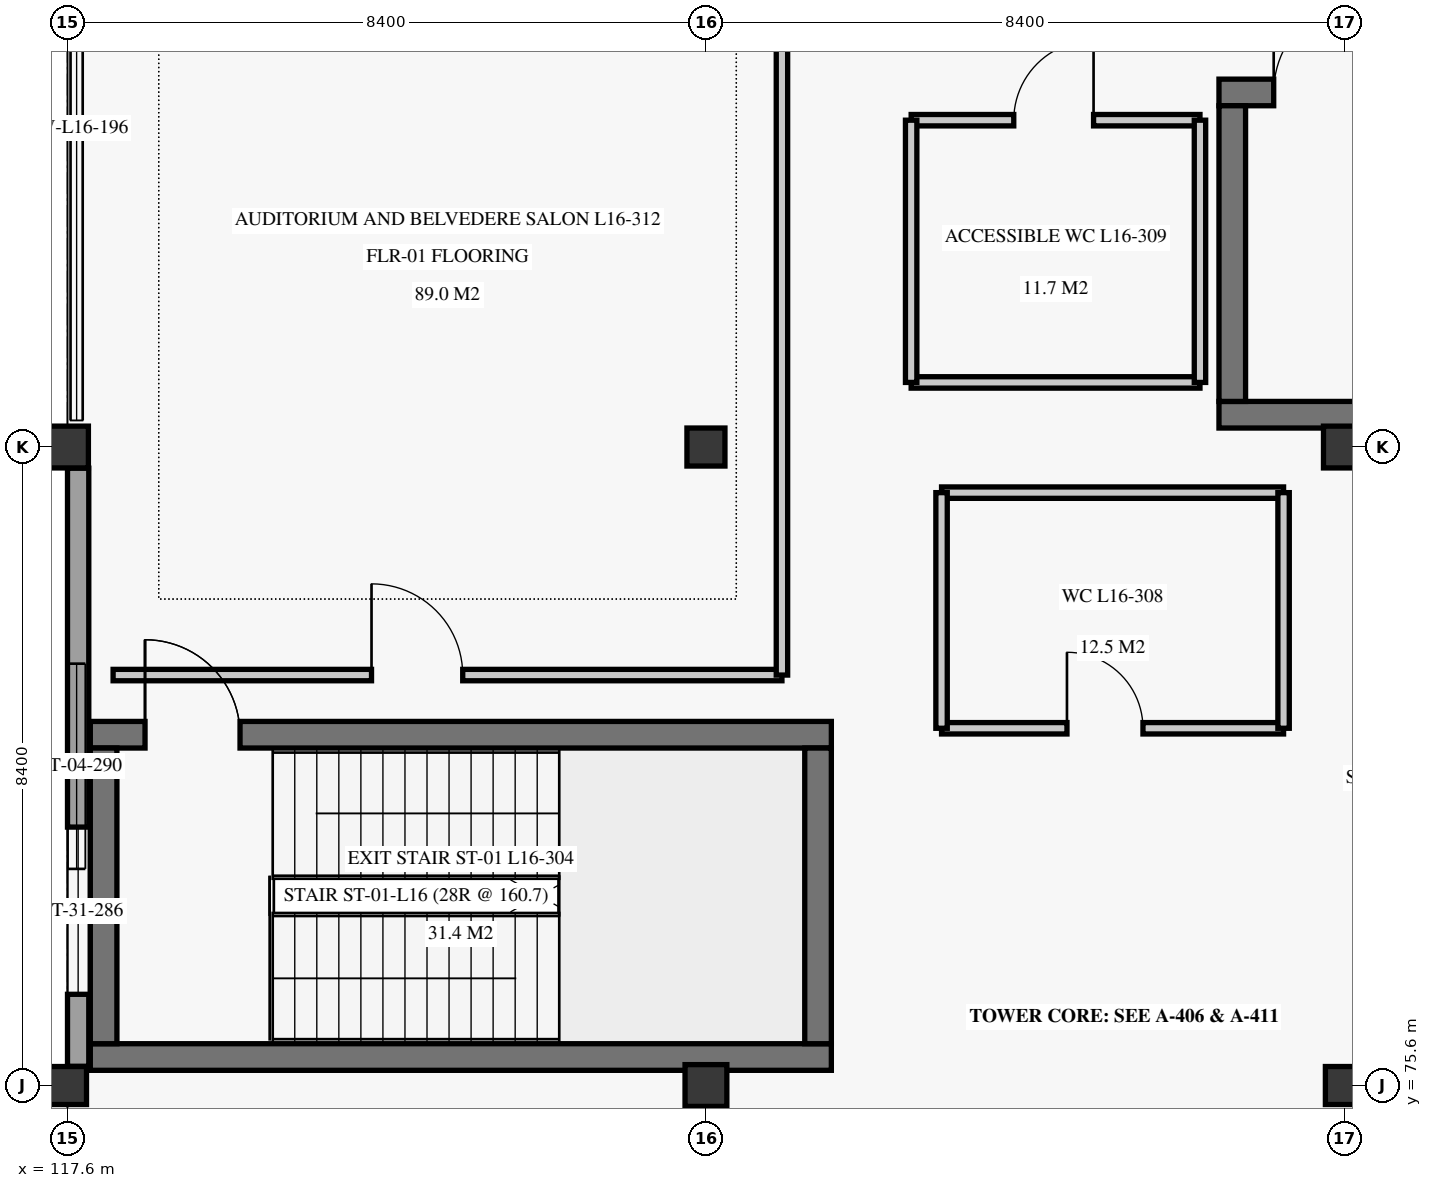
"""IFC4 building model, lengths in metres.
Left out: names, types, materials, properties, quantities, classifications, styles, units other than length and angle.
Written with IfcOpenShell. Run it as: python <this file> out.ifc"""

import sys

from ifc_helpers import new_model, si_unit, direction, frame, frame_2d, origin, origin_2d, place, context, subcontext, project, spatial, rectangle, extrude, element, fill, save


model = new_model("IFC4")
c1 = context("Model", 3, precision=1e-05, world=origin(), true_north=direction((0.0, 1.0)))
c2 = subcontext(c1, "Body", "Model", "MODEL_VIEW")
j1 = project(units=[si_unit("LENGTHUNIT", "METRE"), si_unit("PLANEANGLEUNIT", "RADIAN")], contexts=[c1])
p1 = place(None, origin())
s1 = spatial("IfcSite", under=j1, at=p1, CompositionType="ELEMENT")
p2 = place(p1, origin())
s2 = spatial("IfcBuilding", under=s1, at=p2, CompositionType="ELEMENT")
p3 = place(p2, frame((0.0, 0.0, 66.7)))
s3 = spatial("IfcBuildingStorey", under=s2, at=p3, CompositionType="ELEMENT", Elevation=66.7)
p4 = place(p3, frame((117.6, 75.6, 0.0), z_axis=(0.0, 0.0, 1.0), x_axis=(1.0, 0.0, 0.0)))
e1 = element("IfcColumn", 1, at=p4, inside=s3, PredefinedType="COLUMN", context=c2, shape_type="SweptSolid", body=[
    extrude(rectangle(XDim=0.5, YDim=0.5, at=origin_2d()), origin(), (0.0, 0.0, 1.0), 4.22),
])
for number, where, z_axis, x_axis in (
    (2, (117.6, 84.0, 0.0), (0.0, 0.0, 1.0), (1.0, 0.0, 0.0)),
    (3, (126.0, 75.6, 0.0), (0.0, 0.0, 1.0), (1.0, 0.0, 0.0)),
):
    element("IfcColumn", number, at=place(p3, frame(where, z_axis=z_axis, x_axis=x_axis)), inside=s3, PredefinedType="COLUMN", context=c2, shape_type="SweptSolid", body=[
        extrude(rectangle(XDim=0.55, YDim=0.55, at=origin_2d()), origin(), (0.0, 0.0, 1.0), 4.22),
    ])
for number, where, z_axis, x_axis in (
    (4, (126.0, 84.0, 0.0), (0.0, 0.0, 1.0), (1.0, 0.0, 0.0)),
    (5, (134.4, 75.6, 0.0), (0.0, 0.0, 1.0), (1.0, 0.0, 0.0)),
):
    element("IfcColumn", number, at=place(p3, frame(where, z_axis=z_axis, x_axis=x_axis)), inside=s3, PredefinedType="COLUMN", context=c2, shape_type="SweptSolid", body=[
        extrude(rectangle(XDim=0.5, YDim=0.5, at=origin_2d()), origin(), (0.0, 0.0, 1.0), 4.22),
    ])
p5 = place(p3, frame((134.4, 84.0, 0.0), z_axis=(0.0, 0.0, 1.0), x_axis=(1.0, 0.0, 0.0)))
e6 = element("IfcColumn", 6, at=p5, inside=s3, PredefinedType="COLUMN", context=c2, shape_type="SweptSolid", body=[
    extrude(rectangle(XDim=0.55, YDim=0.55, at=origin_2d()), origin(), (0.0, 0.0, 1.0), 4.22),
])
p6 = place(p3, frame((117.74, 75.852, 0.0), z_axis=(0.0, 0.0, 1.0), x_axis=(0.0, 1.0, 0.0)))
e7 = element("IfcWall", 7, at=p6, inside=s3, PredefinedType="SOLIDWALL", context=c2, shape_type="SweptSolid", body=[
    extrude(rectangle(XDim=7.87, YDim=0.28, at=frame_2d((3.935, 0.0))), origin(), (0.0, 0.0, 1.0), 3.54),
])
p7 = place(p6, frame((0.948, 0.0, 0.85)))
e8 = element("IfcOpeningElement", 8, at=p7, cuts=e7, PredefinedType="OPENING", context=c2, shape_type="SweptSolid", body=[
    extrude(rectangle(XDim=2.2, YDim=1.8, at=frame_2d((1.1, 0.9))), frame((0.0, 0.15, 0.0), z_axis=(0.0, -1.0, 0.0), x_axis=(1.0, 0.0, 0.0)), (0.0, 0.0, 1.0), 0.3),
])
p8 = place(p3, frame((117.72, 67.366, 4.5), z_axis=(0.0, 0.0, 1.0), x_axis=(0.0, 1.0, 0.0)))
e9 = element("IfcWall", 9, at=p8, inside=s3, PredefinedType="SOLIDWALL", context=c2, shape_type="SweptSolid", body=[
    extrude(rectangle(XDim=8.104, YDim=0.23, at=frame_2d((4.052, 0.0))), origin(), (0.0, 0.0, 1.0), 3.15),
])
p9 = place(p3, frame((117.72, 75.73, 4.5), z_axis=(0.0, 0.0, 1.0), x_axis=(0.0, 1.0, 0.0)))
e10 = element("IfcWall", 10, at=p9, inside=s3, PredefinedType="SOLIDWALL", context=c2, shape_type="SweptSolid", body=[
    extrude(rectangle(XDim=8.14, YDim=0.23, at=frame_2d((4.07, 0.0))), origin(), (0.0, 0.0, 1.0), 3.15),
])
p10 = place(p9, frame((2.72, 0.0, 0.5)))
e11 = element("IfcOpeningElement", 11, at=p10, cuts=e10, PredefinedType="OPENING", context=c2, shape_type="SweptSolid", body=[
    extrude(rectangle(XDim=2.7, YDim=2.2, at=frame_2d((1.35, 1.1))), frame((0.0, 0.125, 0.0), z_axis=(0.0, -1.0, 0.0), x_axis=(1.0, 0.0, 0.0)), (0.0, 0.0, 1.0), 0.25),
])
p11 = place(p3, frame((117.72, 84.13, 4.5), z_axis=(0.0, 0.0, 1.0), x_axis=(0.0, 1.0, 0.0)))
e12 = element("IfcWall", 12, at=p11, inside=s3, PredefinedType="SOLIDWALL", context=c2, shape_type="SweptSolid", body=[
    extrude(rectangle(XDim=8.104, YDim=0.23, at=frame_2d((4.052, 0.0))), origin(), (0.0, 0.0, 1.0), 3.15),
])
p12 = place(p3, frame((117.9, 75.975, 0.0), z_axis=(0.0, 0.0, 1.0), x_axis=(1.0, 0.0, 0.0)))
e13 = element("IfcWall", 13, at=p12, inside=s3, PredefinedType="SHEAR", context=c2, shape_type="SweptSolid", body=[
    extrude(rectangle(XDim=9.75, YDim=0.35, at=frame_2d((4.875, 0.0))), origin(), (0.0, 0.0, 1.0), 4.22),
])
p13 = place(p3, frame((117.9, 80.215, 0.0), z_axis=(0.0, 0.0, 1.0), x_axis=(1.0, 0.0, 0.0)))
e14 = element("IfcWall", 14, at=p13, inside=s3, PredefinedType="SHEAR", context=c2, shape_type="SweptSolid", body=[
    extrude(rectangle(XDim=9.75, YDim=0.35, at=frame_2d((4.875, 0.0))), origin(), (0.0, 0.0, 1.0), 4.22),
])
p14 = place(p13, frame((0.72, 0.0, 0.0)))
e15 = element("IfcOpeningElement", 15, at=p14, cuts=e14, PredefinedType="OPENING", context=c2, shape_type="SweptSolid", body=[
    extrude(rectangle(XDim=1.25, YDim=2.2, at=frame_2d((0.625, 1.1))), frame((0.0, 0.185, 0.0), z_axis=(0.0, -1.0, 0.0), x_axis=(1.0, 0.0, 0.0)), (0.0, 0.0, 1.0), 0.37),
])
for number, where, z_axis, x_axis in (
    (16, (118.075, 76.15, 0.0), (0.0, 0.0, 1.0), (0.0, 1.0, 0.0)),
    (17, (127.475, 76.15, 0.0), (0.0, 0.0, 1.0), (0.0, 1.0, 0.0)),
):
    element("IfcWall", number, at=place(p3, frame(where, z_axis=z_axis, x_axis=x_axis)), inside=s3, PredefinedType="SHEAR", context=c2, shape_type="SweptSolid", body=[
        extrude(rectangle(XDim=3.89, YDim=0.35, at=frame_2d((1.945, 0.0))), origin(), (0.0, 0.0, 1.0), 4.22),
    ])
p15 = place(p3, frame((117.9, 75.975, 4.5), z_axis=(0.0, 0.0, 1.0), x_axis=(1.0, 0.0, 0.0)))
e18 = element("IfcWall", 18, at=p15, inside=s3, PredefinedType="SHEAR", context=c2, shape_type="SweptSolid", body=[
    extrude(rectangle(XDim=9.75, YDim=0.35, at=frame_2d((4.875, 0.0))), origin(), (0.0, 0.0, 1.0), 3.58),
])
p16 = place(p3, frame((117.9, 80.215, 4.5), z_axis=(0.0, 0.0, 1.0), x_axis=(1.0, 0.0, 0.0)))
e19 = element("IfcWall", 19, at=p16, inside=s3, PredefinedType="SHEAR", context=c2, shape_type="SweptSolid", body=[
    extrude(rectangle(XDim=9.75, YDim=0.35, at=frame_2d((4.875, 0.0))), origin(), (0.0, 0.0, 1.0), 3.58),
])
p17 = place(p16, frame((0.72, 0.0, 0.0)))
e20 = element("IfcOpeningElement", 20, at=p17, cuts=e19, PredefinedType="OPENING", context=c2, shape_type="SweptSolid", body=[
    extrude(rectangle(XDim=1.25, YDim=2.2, at=frame_2d((0.625, 1.1))), frame((0.0, 0.185, 0.0), z_axis=(0.0, -1.0, 0.0), x_axis=(1.0, 0.0, 0.0)), (0.0, 0.0, 1.0), 0.37),
])
for number, where, z_axis, x_axis in (
    (21, (118.075, 76.15, 4.5), (0.0, 0.0, 1.0), (0.0, 1.0, 0.0)),
    (22, (127.475, 76.15, 4.5), (0.0, 0.0, 1.0), (0.0, 1.0, 0.0)),
):
    element("IfcWall", number, at=place(p3, frame(where, z_axis=z_axis, x_axis=x_axis)), inside=s3, PredefinedType="SHEAR", context=c2, shape_type="SweptSolid", body=[
        extrude(rectangle(XDim=3.89, YDim=0.35, at=frame_2d((1.945, 0.0))), origin(), (0.0, 0.0, 1.0), 3.58),
    ])
p18 = place(p3, frame((132.75, 84.425, 0.0), z_axis=(0.0, 0.0, 1.0), x_axis=(1.0, 0.0, 0.0)))
e23 = element("IfcWall", 23, at=p18, inside=s3, PredefinedType="SHEAR", context=c2, shape_type="SweptSolid", body=[
    extrude(rectangle(XDim=9.75, YDim=0.35, at=frame_2d((4.875, 0.0))), origin(), (0.0, 0.0, 1.0), 4.22),
])
p19 = place(p3, frame((132.75, 88.665, 0.0), z_axis=(0.0, 0.0, 1.0), x_axis=(1.0, 0.0, 0.0)))
e24 = element("IfcWall", 24, at=p19, inside=s3, PredefinedType="SHEAR", context=c2, shape_type="SweptSolid", body=[
    extrude(rectangle(XDim=9.75, YDim=0.35, at=frame_2d((4.875, 0.0))), origin(), (0.0, 0.0, 1.0), 4.22),
])
p20 = place(p19, frame((0.72, 0.0, 0.0)))
e25 = element("IfcOpeningElement", 25, at=p20, cuts=e24, PredefinedType="OPENING", context=c2, shape_type="SweptSolid", body=[
    extrude(rectangle(XDim=1.25, YDim=2.2, at=frame_2d((0.625, 1.1))), frame((0.0, 0.185, 0.0), z_axis=(0.0, -1.0, 0.0), x_axis=(1.0, 0.0, 0.0)), (0.0, 0.0, 1.0), 0.37),
])
p21 = place(p3, frame((132.925, 84.6, 0.0), z_axis=(0.0, 0.0, 1.0), x_axis=(0.0, 1.0, 0.0)))
e26 = element("IfcWall", 26, at=p21, inside=s3, PredefinedType="SHEAR", context=c2, shape_type="SweptSolid", body=[
    extrude(rectangle(XDim=3.89, YDim=0.35, at=frame_2d((1.945, 0.0))), origin(), (0.0, 0.0, 1.0), 4.22),
])
p22 = place(p3, frame((132.75, 84.425, 4.5), z_axis=(0.0, 0.0, 1.0), x_axis=(1.0, 0.0, 0.0)))
e27 = element("IfcWall", 27, at=p22, inside=s3, PredefinedType="SHEAR", context=c2, shape_type="SweptSolid", body=[
    extrude(rectangle(XDim=9.75, YDim=0.35, at=frame_2d((4.875, 0.0))), origin(), (0.0, 0.0, 1.0), 3.58),
])
p23 = place(p3, frame((132.75, 88.665, 4.5), z_axis=(0.0, 0.0, 1.0), x_axis=(1.0, 0.0, 0.0)))
e28 = element("IfcWall", 28, at=p23, inside=s3, PredefinedType="SHEAR", context=c2, shape_type="SweptSolid", body=[
    extrude(rectangle(XDim=9.75, YDim=0.35, at=frame_2d((4.875, 0.0))), origin(), (0.0, 0.0, 1.0), 3.58),
])
p24 = place(p23, frame((0.72, 0.0, 0.0)))
e29 = element("IfcOpeningElement", 29, at=p24, cuts=e28, PredefinedType="OPENING", context=c2, shape_type="SweptSolid", body=[
    extrude(rectangle(XDim=1.25, YDim=2.2, at=frame_2d((0.625, 1.1))), frame((0.0, 0.185, 0.0), z_axis=(0.0, -1.0, 0.0), x_axis=(1.0, 0.0, 0.0)), (0.0, 0.0, 1.0), 0.37),
])
p25 = place(p3, frame((132.925, 84.6, 4.5), z_axis=(0.0, 0.0, 1.0), x_axis=(0.0, 1.0, 0.0)))
e30 = element("IfcWall", 30, at=p25, inside=s3, PredefinedType="SHEAR", context=c2, shape_type="SweptSolid", body=[
    extrude(rectangle(XDim=3.89, YDim=0.35, at=frame_2d((1.945, 0.0))), origin(), (0.0, 0.0, 1.0), 3.58),
])
p26 = place(p3, frame((129.1, 80.3, 0.0), z_axis=(0.0, 0.0, 1.0), x_axis=(1.0, 0.0, 0.0)))
e31 = element("IfcWall", 31, at=p26, inside=s3, PredefinedType="PARTITIONING", context=c2, shape_type="SweptSolid", body=[
    extrude(rectangle(XDim=4.5, YDim=0.15, at=frame_2d((2.25, 0.0))), origin(), (0.0, 0.0, 1.0), 3.84),
])
p27 = place(p26, frame((1.65, 0.0, 0.0)))
e32 = element("IfcOpeningElement", 32, at=p27, cuts=e31, PredefinedType="OPENING", context=c2, shape_type="SweptSolid", body=[
    extrude(rectangle(XDim=1.0, YDim=2.1, at=frame_2d((0.5, 1.05))), frame((0.0, 0.085, 0.0), z_axis=(0.0, -1.0, 0.0), x_axis=(1.0, 0.0, 0.0)), (0.0, 0.0, 1.0), 0.17),
])
p28 = place(p3, frame((129.1, 83.4, 0.0), z_axis=(0.0, 0.0, 1.0), x_axis=(1.0, 0.0, 0.0)))
e33 = element("IfcWall", 33, at=p28, inside=s3, PredefinedType="PARTITIONING", context=c2, shape_type="SweptSolid", body=[
    extrude(rectangle(XDim=4.5, YDim=0.15, at=frame_2d((2.25, 0.0))), origin(), (0.0, 0.0, 1.0), 3.84),
])
for number, where, z_axis, x_axis in (
    (34, (129.1, 80.3, 0.0), (0.0, 0.0, 1.0), (0.0, 1.0, 0.0)),
    (35, (133.6, 80.3, 0.0), (0.0, 0.0, 1.0), (0.0, 1.0, 0.0)),
):
    element("IfcWall", number, at=place(p3, frame(where, z_axis=z_axis, x_axis=x_axis)), inside=s3, PredefinedType="PARTITIONING", context=c2, shape_type="SweptSolid", body=[
        extrude(rectangle(XDim=3.1, YDim=0.15, at=frame_2d((1.55, 0.0))), origin(), (0.0, 0.0, 1.0), 3.84),
    ])
p29 = place(p3, frame((128.7, 88.3, 0.0), z_axis=(0.0, 0.0, 1.0), x_axis=(1.0, 0.0, 0.0)))
e36 = element("IfcWall", 36, at=p29, inside=s3, PredefinedType="PARTITIONING", context=c2, shape_type="SweptSolid", body=[
    extrude(rectangle(XDim=3.8, YDim=0.15, at=frame_2d((1.9, 0.0))), origin(), (0.0, 0.0, 1.0), 3.84),
])
p30 = place(p29, frame((1.35, 0.0, 0.0)))
e37 = element("IfcOpeningElement", 37, at=p30, cuts=e36, PredefinedType="OPENING", context=c2, shape_type="SweptSolid", body=[
    extrude(rectangle(XDim=1.05, YDim=2.15, at=frame_2d((0.525, 1.075))), frame((0.0, 0.085, 0.0), z_axis=(0.0, -1.0, 0.0), x_axis=(1.0, 0.0, 0.0)), (0.0, 0.0, 1.0), 0.17),
])
p31 = place(p3, frame((128.7, 84.85, 0.0), z_axis=(0.0, 0.0, 1.0), x_axis=(1.0, 0.0, 0.0)))
e38 = element("IfcWall", 38, at=p31, inside=s3, PredefinedType="PARTITIONING", context=c2, shape_type="SweptSolid", body=[
    extrude(rectangle(XDim=3.8, YDim=0.15, at=frame_2d((1.9, 0.0))), origin(), (0.0, 0.0, 1.0), 3.84),
])
for number, where, z_axis, x_axis in (
    (39, (128.7, 84.85, 0.0), (0.0, 0.0, 1.0), (0.0, 1.0, 0.0)),
    (40, (132.5, 84.85, 0.0), (0.0, 0.0, 1.0), (0.0, 1.0, 0.0)),
):
    element("IfcWall", number, at=place(p3, frame(where, z_axis=z_axis, x_axis=x_axis)), inside=s3, PredefinedType="PARTITIONING", context=c2, shape_type="SweptSolid", body=[
        extrude(rectangle(XDim=3.45, YDim=0.15, at=frame_2d((1.725, 0.0))), origin(), (0.0, 0.0, 1.0), 3.84),
    ])
p32 = place(p3, frame((118.2, 81.0, 0.0), z_axis=(0.0, 0.0, 1.0), x_axis=(1.0, 0.0, 0.0)))
e41 = element("IfcWall", 41, at=p32, inside=s3, PredefinedType="PARTITIONING", context=c2, shape_type="SweptSolid", body=[
    extrude(rectangle(XDim=8.8, YDim=0.15, at=frame_2d((4.4, 0.0))), origin(), (0.0, 0.0, 1.0), 3.84),
])
p33 = place(p32, frame((3.4, 0.0, 0.0)))
e42 = element("IfcOpeningElement", 42, at=p33, cuts=e41, PredefinedType="OPENING", context=c2, shape_type="SweptSolid", body=[
    extrude(rectangle(XDim=1.2, YDim=2.3, at=frame_2d((0.6, 1.15))), frame((0.0, 0.085, 0.0), z_axis=(0.0, -1.0, 0.0), x_axis=(1.0, 0.0, 0.0)), (0.0, 0.0, 1.0), 0.17),
])
p34 = place(p3, frame((127.0, 81.0, 0.0), z_axis=(0.0, 0.0, 1.0), x_axis=(0.0, 1.0, 0.0)))
e43 = element("IfcWall", 43, at=p34, inside=s3, PredefinedType="PARTITIONING", context=c2, shape_type="SweptSolid", body=[
    extrude(rectangle(XDim=11.0, YDim=0.15, at=frame_2d((5.5, 0.0))), origin(), (0.0, 0.0, 1.0), 3.84),
])
p35 = place(p7, origin())
e44 = element("IfcWindow", 44, at=p35, inside=s3, PartitioningType="SINGLE_PANEL", PredefinedType="WINDOW", context=c2, shape_type="SweptSolid", body=[
    extrude(rectangle(XDim=2.2, YDim=1.8, at=frame_2d((1.1, 0.9))), frame((0.0, 0.03, 0.0), z_axis=(0.0, -1.0, 0.0), x_axis=(1.0, 0.0, 0.0)), (0.0, 0.0, 1.0), 0.06),
])
fill(e8, e44)
p36 = place(p10, origin())
e45 = element("IfcWindow", 45, at=p36, inside=s3, PartitioningType="SINGLE_PANEL", PredefinedType="WINDOW", context=c2, shape_type="SweptSolid", body=[
    extrude(rectangle(XDim=2.7, YDim=2.2, at=frame_2d((1.35, 1.1))), frame((0.0, 0.03, 0.0), z_axis=(0.0, -1.0, 0.0), x_axis=(1.0, 0.0, 0.0)), (0.0, 0.0, 1.0), 0.06),
])
fill(e11, e45)
p37 = place(p14, origin())
e46 = element("IfcDoor", 46, at=p37, inside=s3, OperationType="SINGLE_SWING_LEFT", PredefinedType="DOOR", context=c2, shape_type="SweptSolid", body=[
    extrude(rectangle(XDim=1.25, YDim=2.2, at=frame_2d((0.625, 1.1))), frame((0.0, 0.025, 0.0), z_axis=(0.0, -1.0, 0.0), x_axis=(1.0, 0.0, 0.0)), (0.0, 0.0, 1.0), 0.05),
])
fill(e15, e46)
p38 = place(p17, origin())
e47 = element("IfcDoor", 47, at=p38, inside=s3, OperationType="SINGLE_SWING_LEFT", PredefinedType="DOOR", context=c2, shape_type="SweptSolid", body=[
    extrude(rectangle(XDim=1.25, YDim=2.2, at=frame_2d((0.625, 1.1))), frame((0.0, 0.025, 0.0), z_axis=(0.0, -1.0, 0.0), x_axis=(1.0, 0.0, 0.0)), (0.0, 0.0, 1.0), 0.05),
])
fill(e20, e47)
p39 = place(p20, origin())
e48 = element("IfcDoor", 48, at=p39, inside=s3, OperationType="SINGLE_SWING_RIGHT", PredefinedType="DOOR", context=c2, shape_type="SweptSolid", body=[
    extrude(rectangle(XDim=1.25, YDim=2.2, at=frame_2d((0.625, 1.1))), frame((0.0, 0.025, 0.0), z_axis=(0.0, -1.0, 0.0), x_axis=(1.0, 0.0, 0.0)), (0.0, 0.0, 1.0), 0.05),
])
fill(e25, e48)
p40 = place(p24, origin())
e49 = element("IfcDoor", 49, at=p40, inside=s3, OperationType="SINGLE_SWING_LEFT", PredefinedType="DOOR", context=c2, shape_type="SweptSolid", body=[
    extrude(rectangle(XDim=1.25, YDim=2.2, at=frame_2d((0.625, 1.1))), frame((0.0, 0.025, 0.0), z_axis=(0.0, -1.0, 0.0), x_axis=(1.0, 0.0, 0.0)), (0.0, 0.0, 1.0), 0.05),
])
fill(e29, e49)
p41 = place(p27, origin())
e50 = element("IfcDoor", 50, at=p41, inside=s3, OperationType="SINGLE_SWING_LEFT", PredefinedType="DOOR", context=c2, shape_type="SweptSolid", body=[
    extrude(rectangle(XDim=1.0, YDim=2.1, at=frame_2d((0.5, 1.05))), frame((0.0, 0.025, 0.0), z_axis=(0.0, -1.0, 0.0), x_axis=(1.0, 0.0, 0.0)), (0.0, 0.0, 1.0), 0.05),
])
fill(e32, e50)
p42 = place(p30, origin())
e51 = element("IfcDoor", 51, at=p42, inside=s3, OperationType="SINGLE_SWING_RIGHT", PredefinedType="DOOR", context=c2, shape_type="SweptSolid", body=[
    extrude(rectangle(XDim=1.05, YDim=2.15, at=frame_2d((0.525, 1.075))), frame((0.0, 0.025, 0.0), z_axis=(0.0, -1.0, 0.0), x_axis=(1.0, 0.0, 0.0)), (0.0, 0.0, 1.0), 0.05),
])
fill(e37, e51)
p43 = place(p33, origin())
e52 = element("IfcDoor", 52, at=p43, inside=s3, OperationType="SINGLE_SWING_LEFT", PredefinedType="DOOR", context=c2, shape_type="SweptSolid", body=[
    extrude(rectangle(XDim=1.2, YDim=2.3, at=frame_2d((0.6, 1.15))), frame((0.0, 0.025, 0.0), z_axis=(0.0, -1.0, 0.0), x_axis=(1.0, 0.0, 0.0)), (0.0, 0.0, 1.0), 0.05),
])
fill(e42, e52)
save(model, sys.argv[1])
